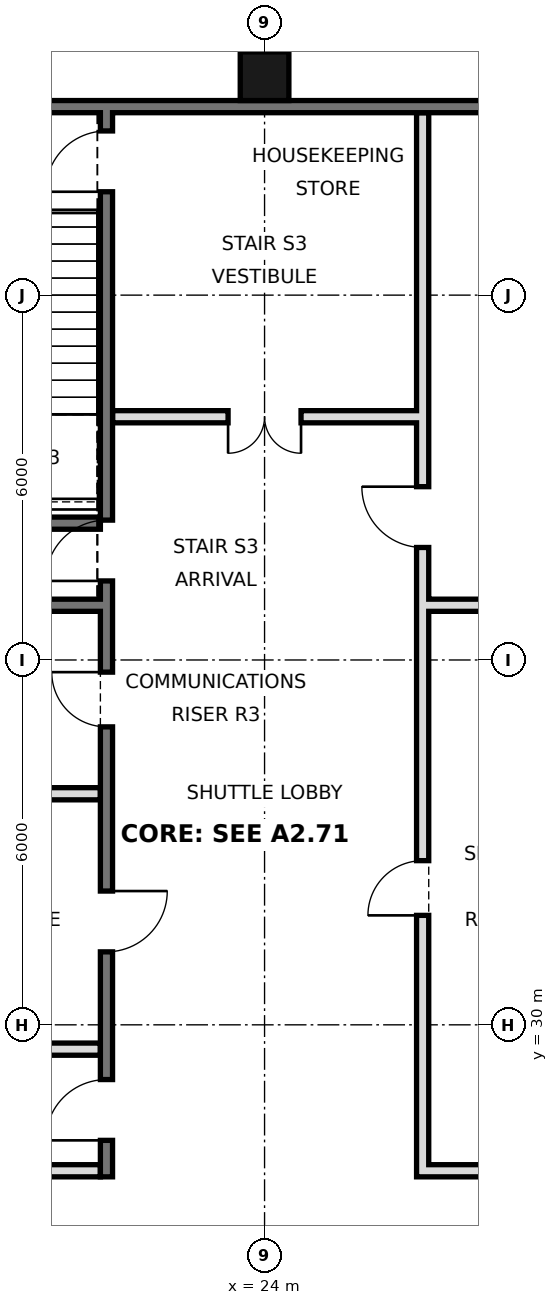
"""IFC4 building model, lengths in metres.
Left out: names, types, materials, properties, quantities, classifications, styles, units other than length and angle.
Written with IfcOpenShell. Run it as: python <this file> out.ifc"""

import sys

from ifc_helpers import new_model, si_unit, direction, frame, frame_2d, origin, origin_2d, place, context, subcontext, project, spatial, rectangle, hollow_rectangle, extrude, element, fill, save


model = new_model("IFC4")
c1 = context("Model", 3, precision=1e-05, world=origin(), true_north=direction((0.0, 1.0)))
c2 = subcontext(c1, "Body", "Model", "MODEL_VIEW")
j1 = project(units=[si_unit("LENGTHUNIT", "METRE"), si_unit("PLANEANGLEUNIT", "RADIAN")], contexts=[c1])
p1 = place(None, origin())
s1 = spatial("IfcSite", under=j1, at=p1, CompositionType="ELEMENT")
p2 = place(p1, origin())
s2 = spatial("IfcBuilding", under=s1, at=p2, CompositionType="ELEMENT")
p3 = place(p2, frame((0.0, 0.0, 281.8)))
s3 = spatial("IfcBuildingStorey", under=s2, at=p3, CompositionType="ELEMENT", Elevation=281.8)
p4 = place(p3, frame((24.0, 45.6, 0.0), z_axis=(0.0, 0.0, 1.0), x_axis=(1.0, 0.0, 0.0)))
e1 = element("IfcColumn", 1, at=p4, inside=s3, PredefinedType="COLUMN", context=c2, shape_type="SweptSolid", body=[
    extrude(hollow_rectangle(XDim=0.8, YDim=0.8, WallThickness=0.032, at=origin_2d()), origin(), (0.0, 0.0, 1.0), 9.0),
])
p5 = place(p3, frame((6.6, 45.1, 0.0), z_axis=(0.0, 0.0, 1.0), x_axis=(1.0, 0.0, 0.0)))
e2 = element("IfcWall", 2, at=p5, inside=s3, PredefinedType="SOLIDWALL", context=c2, shape_type="SweptSolid", body=[
    extrude(rectangle(XDim=34.8, YDim=0.2, at=frame_2d((17.4, 0.0))), origin(), (0.0, 0.0, 1.0), 8.7),
])
p6 = place(p3, frame((21.4, 27.5, 0.0), z_axis=(0.0, 0.0, 1.0), x_axis=(0.0, 1.0, 0.0)))
e3 = element("IfcWall", 3, at=p6, inside=s3, PredefinedType="SOLIDWALL", context=c2, shape_type="SweptSolid", body=[
    extrude(rectangle(XDim=17.5, YDim=0.2, at=frame_2d((8.75, 0.0))), origin(), (0.0, 0.0, 1.0), 8.7),
])
p7 = place(p6, frame((0.6, 0.0, 0.0)))
e4 = element("IfcOpeningElement", 4, at=p7, cuts=e3, PredefinedType="OPENING", context=c2, shape_type="SweptSolid", body=[
    extrude(rectangle(XDim=1.0, YDim=2.1, at=frame_2d((0.5, 1.05))), frame((0.0, 0.11, 0.0), z_axis=(0.0, -1.0, 0.0), x_axis=(1.0, 0.0, 0.0)), (0.0, 0.0, 1.0), 0.22),
])
p8 = place(p6, frame((3.7, 0.0, 0.0)))
e5 = element("IfcOpeningElement", 5, at=p8, cuts=e3, PredefinedType="OPENING", context=c2, shape_type="SweptSolid", body=[
    extrude(rectangle(XDim=1.0, YDim=2.1, at=frame_2d((0.5, 1.05))), frame((0.0, 0.11, 0.0), z_axis=(0.0, -1.0, 0.0), x_axis=(1.0, 0.0, 0.0)), (0.0, 0.0, 1.0), 0.22),
])
p9 = place(p6, frame((9.8, 0.0, 0.0)))
e6 = element("IfcOpeningElement", 6, at=p9, cuts=e3, PredefinedType="OPENING", context=c2, shape_type="SweptSolid", body=[
    extrude(rectangle(XDim=1.0, YDim=2.1, at=frame_2d((0.5, 1.05))), frame((0.0, 0.11, 0.0), z_axis=(0.0, -1.0, 0.0), x_axis=(1.0, 0.0, 0.0)), (0.0, 0.0, 1.0), 0.22),
])
p10 = place(p6, frame((16.2, 0.0, 0.0)))
e7 = element("IfcOpeningElement", 7, at=p10, cuts=e3, PredefinedType="OPENING", context=c2, shape_type="SweptSolid", body=[
    extrude(rectangle(XDim=1.0, YDim=2.1, at=frame_2d((0.5, 1.05))), frame((0.0, 0.11, 0.0), z_axis=(0.0, -1.0, 0.0), x_axis=(1.0, 0.0, 0.0)), (0.0, 0.0, 1.0), 0.22),
])
p11 = place(p6, frame((7.4, 0.0, 0.0)))
e8 = element("IfcOpeningElement", 8, at=p11, cuts=e3, PredefinedType="OPENING", context=c2, shape_type="SweptSolid", body=[
    extrude(rectangle(XDim=0.9, YDim=2.1, at=frame_2d((0.45, 1.05))), frame((0.0, 0.11, 0.0), z_axis=(0.0, -1.0, 0.0), x_axis=(1.0, 0.0, 0.0)), (0.0, 0.0, 1.0), 0.22),
])
p12 = place(p3, frame((26.6, 27.5, 0.0), z_axis=(0.0, 0.0, 1.0), x_axis=(0.0, 1.0, 0.0)))
e9 = element("IfcWall", 9, at=p12, inside=s3, PredefinedType="SOLIDWALL", context=c2, shape_type="SweptSolid", body=[
    extrude(rectangle(XDim=17.5, YDim=0.2, at=frame_2d((8.75, 0.0))), origin(), (0.0, 0.0, 1.0), 8.7),
])
p13 = place(p12, frame((4.3, 0.0, 0.0)))
e10 = element("IfcOpeningElement", 10, at=p13, cuts=e9, PredefinedType="OPENING", context=c2, shape_type="SweptSolid", body=[
    extrude(rectangle(XDim=0.9, YDim=2.1, at=frame_2d((0.45, 1.05))), frame((0.0, 0.11, 0.0), z_axis=(0.0, -1.0, 0.0), x_axis=(1.0, 0.0, 0.0)), (0.0, 0.0, 1.0), 0.22),
])
p14 = place(p12, frame((10.35, 0.0, 0.0)))
e11 = element("IfcOpeningElement", 11, at=p14, cuts=e9, PredefinedType="OPENING", context=c2, shape_type="SweptSolid", body=[
    extrude(rectangle(XDim=1.0, YDim=2.1, at=frame_2d((0.5, 1.05))), frame((0.0, 0.11, 0.0), z_axis=(0.0, -1.0, 0.0), x_axis=(1.0, 0.0, 0.0)), (0.0, 0.0, 1.0), 0.22),
])
p15 = place(p3, frame((18.6, 27.6, 0.0), z_axis=(0.0, 0.0, 1.0), x_axis=(1.0, 0.0, 0.0)))
e12 = element("IfcWall", 12, at=p15, inside=s3, PredefinedType="PARTITIONING", context=c2, shape_type="SweptSolid", body=[
    extrude(rectangle(XDim=2.7, YDim=0.2, at=frame_2d((1.35, 0.0))), origin(), (0.0, 0.0, 1.0), 8.7),
])
p16 = place(p3, frame((26.7, 27.6, 0.0), z_axis=(0.0, 0.0, 1.0), x_axis=(1.0, 0.0, 0.0)))
e13 = element("IfcWall", 13, at=p16, inside=s3, PredefinedType="SOLIDWALL", context=c2, shape_type="SweptSolid", body=[
    extrude(rectangle(XDim=2.7, YDim=0.2, at=frame_2d((1.35, 0.0))), origin(), (0.0, 0.0, 1.0), 8.7),
])
p17 = place(p3, frame((18.6, 29.6, 0.0), z_axis=(0.0, 0.0, 1.0), x_axis=(1.0, 0.0, 0.0)))
e14 = element("IfcWall", 14, at=p17, inside=s3, PredefinedType="PARTITIONING", context=c2, shape_type="SweptSolid", body=[
    extrude(rectangle(XDim=2.7, YDim=0.2, at=frame_2d((1.35, 0.0))), origin(), (0.0, 0.0, 1.0), 8.7),
])
for number, where, z_axis, x_axis in (
    (15, (18.6, 33.8, 0.0), (0.0, 0.0, 1.0), (1.0, 0.0, 0.0)),
    (16, (18.6, 36.9, 0.0), (0.0, 0.0, 1.0), (1.0, 0.0, 0.0)),
    (17, (26.7, 36.9, 0.0), (0.0, 0.0, 1.0), (1.0, 0.0, 0.0)),
):
    element("IfcWall", number, at=place(p3, frame(where, z_axis=z_axis, x_axis=x_axis)), inside=s3, PredefinedType="SOLIDWALL", context=c2, shape_type="SweptSolid", body=[
        extrude(rectangle(XDim=2.7, YDim=0.2, at=frame_2d((1.35, 0.0))), origin(), (0.0, 0.0, 1.0), 8.7),
    ])
p18 = place(p3, frame((18.6, 38.25, 0.0), z_axis=(0.0, 0.0, 1.0), x_axis=(1.0, 0.0, 0.0)))
e18 = element("IfcWall", 18, at=p18, inside=s3, PredefinedType="SOLIDWALL", context=c2, shape_type="SweptSolid", body=[
    extrude(rectangle(XDim=2.7, YDim=0.2, at=frame_2d((1.35, 0.0))), origin(), (0.0, 0.0, 1.0), 4.3),
])
p19 = place(p3, frame((21.5, 40.0, 0.0), z_axis=(0.0, 0.0, 1.0), x_axis=(1.0, 0.0, 0.0)))
e19 = element("IfcWall", 19, at=p19, inside=s3, PredefinedType="PARTITIONING", context=c2, shape_type="SweptSolid", body=[
    extrude(rectangle(XDim=5.0, YDim=0.2, at=frame_2d((2.5, 0.0))), origin(), (0.0, 0.0, 1.0), 8.7),
])
p20 = place(p19, frame((1.9, 0.0, 0.0)))
e20 = element("IfcOpeningElement", 20, at=p20, cuts=e19, PredefinedType="OPENING", context=c2, shape_type="SweptSolid", body=[
    extrude(rectangle(XDim=1.2, YDim=2.1, at=frame_2d((0.6, 1.05))), frame((0.0, 0.11, 0.0), z_axis=(0.0, -1.0, 0.0), x_axis=(1.0, 0.0, 0.0)), (0.0, 0.0, 1.0), 0.22),
])
p21 = place(p20, frame((1.2, 0.0, 0.0), z_axis=(0.0, 0.0, 1.0), x_axis=(-1.0, 0.0, 0.0)))
e21 = element("IfcDoor", 21, at=p21, inside=s3, OperationType="DOUBLE_DOOR_SINGLE_SWING", PredefinedType="DOOR", context=c2, shape_type="SweptSolid", body=[
    extrude(rectangle(XDim=1.2, YDim=2.1, at=frame_2d((0.6, 1.05))), frame((0.0, 0.025, 0.0), z_axis=(0.0, -1.0, 0.0), x_axis=(1.0, 0.0, 0.0)), (0.0, 0.0, 1.0), 0.05),
])
fill(e20, e21)
p22 = place(p7, origin())
e22 = element("IfcDoor", 22, at=p22, inside=s3, OperationType="SINGLE_SWING_LEFT", PredefinedType="DOOR", context=c2, shape_type="SweptSolid", body=[
    extrude(rectangle(XDim=1.0, YDim=2.1, at=frame_2d((0.5, 1.05))), frame((0.0, 0.025, 0.0), z_axis=(0.0, -1.0, 0.0), x_axis=(1.0, 0.0, 0.0)), (0.0, 0.0, 1.0), 0.05),
])
fill(e4, e22)
p23 = place(p8, origin())
e23 = element("IfcDoor", 23, at=p23, inside=s3, OperationType="SINGLE_SWING_RIGHT", PredefinedType="DOOR", context=c2, shape_type="SweptSolid", body=[
    extrude(rectangle(XDim=1.0, YDim=2.1, at=frame_2d((0.5, 1.05))), frame((0.0, 0.025, 0.0), z_axis=(0.0, -1.0, 0.0), x_axis=(1.0, 0.0, 0.0)), (0.0, 0.0, 1.0), 0.05),
])
fill(e5, e23)
p24 = place(p9, origin())
e24 = element("IfcDoor", 24, at=p24, inside=s3, OperationType="SINGLE_SWING_LEFT", PredefinedType="DOOR", context=c2, shape_type="SweptSolid", body=[
    extrude(rectangle(XDim=1.0, YDim=2.1, at=frame_2d((0.5, 1.05))), frame((0.0, 0.025, 0.0), z_axis=(0.0, -1.0, 0.0), x_axis=(1.0, 0.0, 0.0)), (0.0, 0.0, 1.0), 0.05),
])
fill(e6, e24)
p25 = place(p10, origin())
e25 = element("IfcDoor", 25, at=p25, inside=s3, OperationType="SINGLE_SWING_LEFT", PredefinedType="DOOR", context=c2, shape_type="SweptSolid", body=[
    extrude(rectangle(XDim=1.0, YDim=2.1, at=frame_2d((0.5, 1.05))), frame((0.0, 0.025, 0.0), z_axis=(0.0, -1.0, 0.0), x_axis=(1.0, 0.0, 0.0)), (0.0, 0.0, 1.0), 0.05),
])
fill(e7, e25)
p26 = place(p11, frame((0.9, 0.0, 0.0), z_axis=(0.0, 0.0, 1.0), x_axis=(-1.0, 0.0, 0.0)))
e26 = element("IfcDoor", 26, at=p26, inside=s3, OperationType="SINGLE_SWING_LEFT", PredefinedType="DOOR", context=c2, shape_type="SweptSolid", body=[
    extrude(rectangle(XDim=0.9, YDim=2.1, at=frame_2d((0.45, 1.05))), frame((0.0, 0.025, 0.0), z_axis=(0.0, -1.0, 0.0), x_axis=(1.0, 0.0, 0.0)), (0.0, 0.0, 1.0), 0.05),
])
fill(e8, e26)
p27 = place(p13, origin())
e27 = element("IfcDoor", 27, at=p27, inside=s3, OperationType="SINGLE_SWING_LEFT", PredefinedType="DOOR", context=c2, shape_type="SweptSolid", body=[
    extrude(rectangle(XDim=0.9, YDim=2.1, at=frame_2d((0.45, 1.05))), frame((0.0, 0.025, 0.0), z_axis=(0.0, -1.0, 0.0), x_axis=(1.0, 0.0, 0.0)), (0.0, 0.0, 1.0), 0.05),
])
fill(e10, e27)
p28 = place(p14, frame((1.0, 0.0, 0.0), z_axis=(0.0, 0.0, 1.0), x_axis=(-1.0, 0.0, 0.0)))
e28 = element("IfcDoor", 28, at=p28, inside=s3, OperationType="SINGLE_SWING_LEFT", PredefinedType="DOOR", context=c2, shape_type="SweptSolid", body=[
    extrude(rectangle(XDim=1.0, YDim=2.1, at=frame_2d((0.5, 1.05))), frame((0.0, 0.025, 0.0), z_axis=(0.0, -1.0, 0.0), x_axis=(1.0, 0.0, 0.0)), (0.0, 0.0, 1.0), 0.05),
])
fill(e11, e28)
save(model, sys.argv[1])
